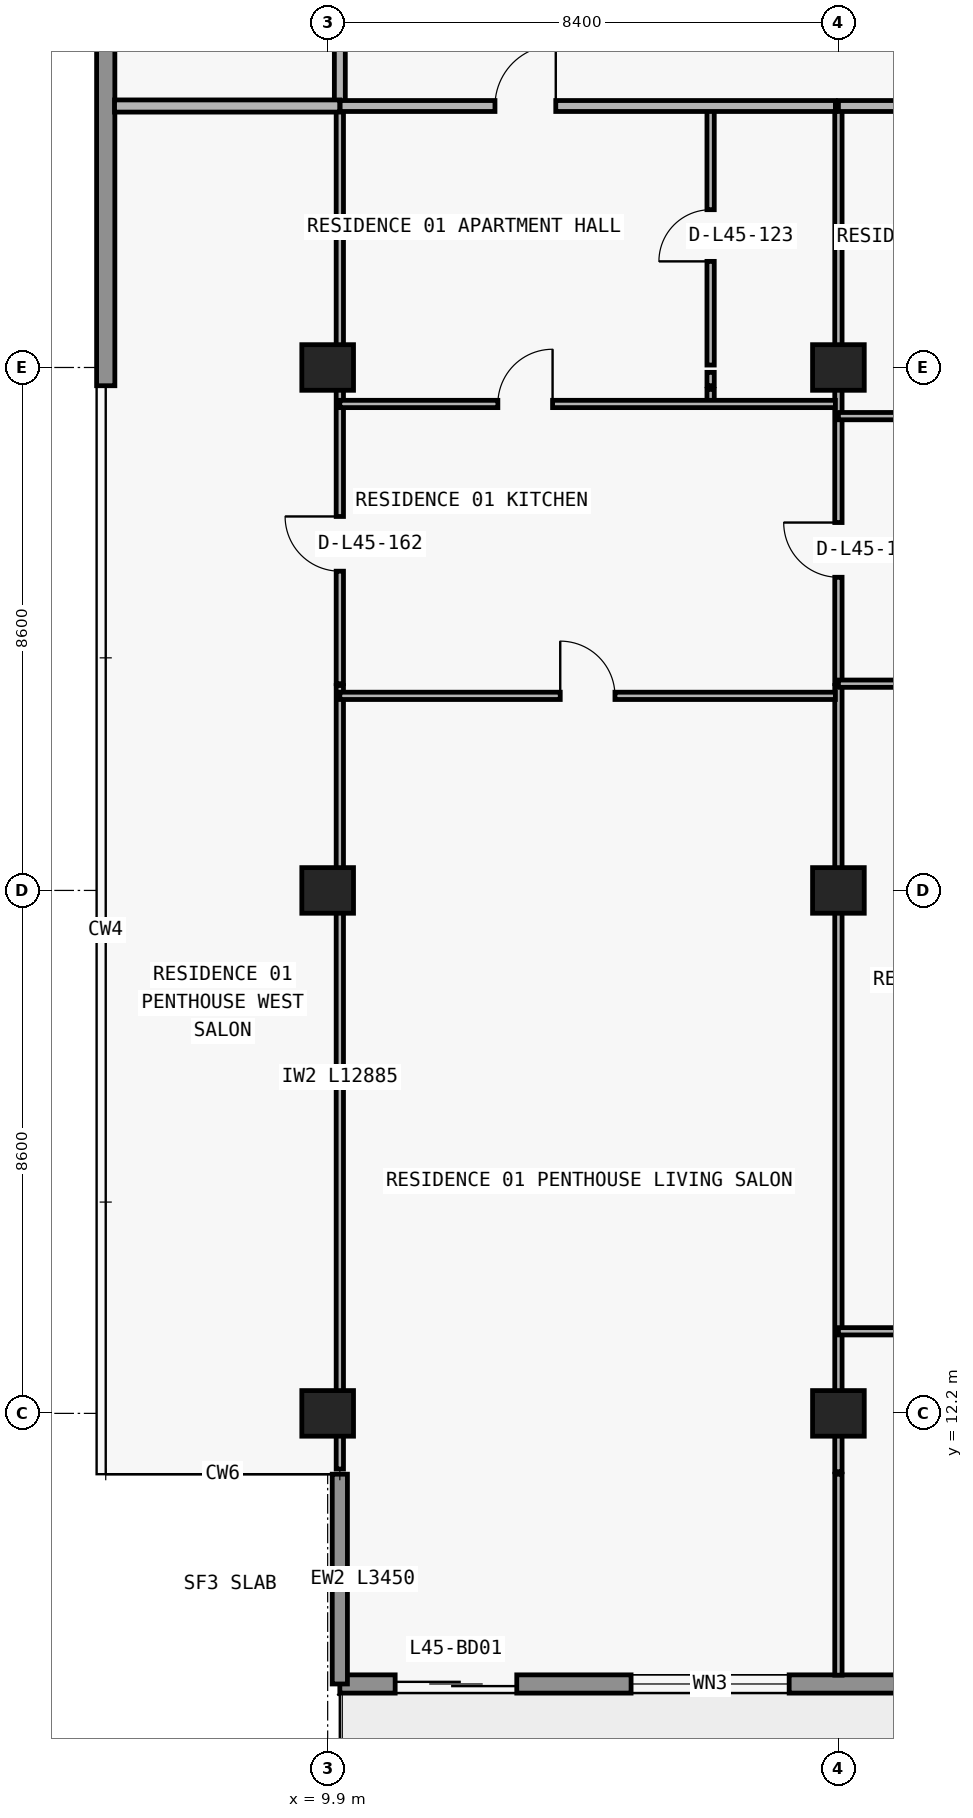
"""IFC4 building model, lengths in metres.
Left out: names, types, materials, properties, quantities, classifications, styles, units other than length and angle.
Written with IfcOpenShell. Run it as: python <this file> out.ifc"""

import sys

from ifc_helpers import new_model, si_unit, direction, frame, frame_2d, origin, origin_2d, place, context, subcontext, project, spatial, rectangle, extrude, element, fill, save


model = new_model("IFC4")
c1 = context("Model", 3, precision=1e-05, world=origin(), true_north=direction((0.0, 1.0)))
c2 = subcontext(c1, "Body", "Model", "MODEL_VIEW")
j1 = project(units=[si_unit("LENGTHUNIT", "METRE"), si_unit("PLANEANGLEUNIT", "RADIAN")], contexts=[c1])
p1 = place(None, origin())
s1 = spatial("IfcSite", under=j1, at=p1, CompositionType="ELEMENT")
p2 = place(p1, origin())
s2 = spatial("IfcBuilding", under=s1, at=p2, CompositionType="ELEMENT")
p3 = place(p2, frame((0.0, 0.0, 163.8)))
s3 = spatial("IfcBuildingStorey", under=s2, at=p3, CompositionType="ELEMENT", Elevation=163.8)
for number, where, z_axis, x_axis in (
    (1, (9.9, 12.2, 0.0), (0.0, 0.0, 1.0), (1.0, 0.0, 0.0)),
    (2, (18.3, 12.2, 0.0), (0.0, 0.0, 1.0), (1.0, 0.0, 0.0)),
    (3, (9.9, 20.8, 0.0), (0.0, 0.0, 1.0), (1.0, 0.0, 0.0)),
    (4, (18.3, 20.8, 0.0), (0.0, 0.0, 1.0), (1.0, 0.0, 0.0)),
    (5, (9.9, 29.4, 0.0), (0.0, 0.0, 1.0), (1.0, 0.0, 0.0)),
    (6, (18.3, 29.4, 0.0), (0.0, 0.0, 1.0), (1.0, 0.0, 0.0)),
):
    element("IfcColumn", number, at=place(p3, frame(where, z_axis=z_axis, x_axis=x_axis)), inside=s3, PredefinedType="COLUMN", context=c2, shape_type="SweptSolid", body=[
        extrude(rectangle(XDim=0.85, YDim=0.75, at=origin_2d()), origin(), (0.0, 0.0, 1.0), 3.05),
    ])
p4 = place(p3, frame((67.7, 7.75, 0.0), z_axis=(0.0, 0.0, 1.0), x_axis=(-1.0, 0.0, 0.0)))
e7 = element("IfcWall", 7, at=p4, inside=s3, PredefinedType="STANDARD", context=c2, shape_type="SweptSolid", body=[
    extrude(rectangle(XDim=57.6, YDim=0.3, at=frame_2d((28.8, 0.0))), origin(), (0.0, 0.0, 1.0), 3.05),
])
p5 = place(p4, frame((54.69, 0.0, 0.0)))
e8 = element("IfcOpeningElement", 8, at=p5, cuts=e7, PredefinedType="OPENING", context=c2, shape_type="SweptSolid", body=[
    extrude(rectangle(XDim=2.0, YDim=2.3, at=frame_2d((1.0, 1.15))), frame((0.0, 0.16, 0.0), z_axis=(0.0, -1.0, 0.0), x_axis=(1.0, 0.0, 0.0)), (0.0, 0.0, 1.0), 0.32),
])
p6 = place(p4, frame((50.21, 0.0, 0.65)))
e9 = element("IfcOpeningElement", 9, at=p6, cuts=e7, PredefinedType="OPENING", context=c2, shape_type="SweptSolid", body=[
    extrude(rectangle(XDim=2.6, YDim=1.85, at=frame_2d((1.3, 0.925))), frame((0.0, 0.16, 0.0), z_axis=(0.0, -1.0, 0.0), x_axis=(1.0, 0.0, 0.0)), (0.0, 0.0, 1.0), 0.32),
])
p7 = place(p4, frame((44.1, 0.0, 0.85)))
e10 = element("IfcOpeningElement", 10, at=p7, cuts=e7, PredefinedType="OPENING", context=c2, shape_type="SweptSolid", body=[
    extrude(rectangle(XDim=2.2, YDim=1.55, at=frame_2d((1.1, 0.775))), frame((0.0, 0.16, 0.0), z_axis=(0.0, -1.0, 0.0), x_axis=(1.0, 0.0, 0.0)), (0.0, 0.0, 1.0), 0.32),
])
p8 = place(p4, frame((37.69, 0.0, 0.0)))
e11 = element("IfcOpeningElement", 11, at=p8, cuts=e7, PredefinedType="OPENING", context=c2, shape_type="SweptSolid", body=[
    extrude(rectangle(XDim=2.0, YDim=2.3, at=frame_2d((1.0, 1.15))), frame((0.0, 0.16, 0.0), z_axis=(0.0, -1.0, 0.0), x_axis=(1.0, 0.0, 0.0)), (0.0, 0.0, 1.0), 0.32),
])
p9 = place(p4, frame((33.59, 0.0, 0.85)))
e12 = element("IfcOpeningElement", 12, at=p9, cuts=e7, PredefinedType="OPENING", context=c2, shape_type="SweptSolid", body=[
    extrude(rectangle(XDim=1.8, YDim=1.55, at=frame_2d((0.9, 0.775))), frame((0.0, 0.16, 0.0), z_axis=(0.0, -1.0, 0.0), x_axis=(1.0, 0.0, 0.0)), (0.0, 0.0, 1.0), 0.32),
])
p10 = place(p4, frame((25.914, 0.0, 0.85)))
e13 = element("IfcOpeningElement", 13, at=p10, cuts=e7, PredefinedType="OPENING", context=c2, shape_type="SweptSolid", body=[
    extrude(rectangle(XDim=2.2, YDim=1.55, at=frame_2d((1.1, 0.775))), frame((0.0, 0.16, 0.0), z_axis=(0.0, -1.0, 0.0), x_axis=(1.0, 0.0, 0.0)), (0.0, 0.0, 1.0), 0.32),
])
p11 = place(p4, frame((21.69, 0.0, 0.0)))
e14 = element("IfcOpeningElement", 14, at=p11, cuts=e7, PredefinedType="OPENING", context=c2, shape_type="SweptSolid", body=[
    extrude(rectangle(XDim=2.0, YDim=2.3, at=frame_2d((1.0, 1.15))), frame((0.0, 0.16, 0.0), z_axis=(0.0, -1.0, 0.0), x_axis=(1.0, 0.0, 0.0)), (0.0, 0.0, 1.0), 0.32),
])
p12 = place(p4, frame((17.59, 0.0, 0.85)))
e15 = element("IfcOpeningElement", 15, at=p12, cuts=e7, PredefinedType="OPENING", context=c2, shape_type="SweptSolid", body=[
    extrude(rectangle(XDim=1.8, YDim=1.55, at=frame_2d((0.9, 0.775))), frame((0.0, 0.16, 0.0), z_axis=(0.0, -1.0, 0.0), x_axis=(1.0, 0.0, 0.0)), (0.0, 0.0, 1.0), 0.32),
])
p13 = place(p4, frame((13.69, 0.0, 0.0)))
e16 = element("IfcOpeningElement", 16, at=p13, cuts=e7, PredefinedType="OPENING", context=c2, shape_type="SweptSolid", body=[
    extrude(rectangle(XDim=2.0, YDim=2.3, at=frame_2d((1.0, 1.15))), frame((0.0, 0.16, 0.0), z_axis=(0.0, -1.0, 0.0), x_axis=(1.0, 0.0, 0.0)), (0.0, 0.0, 1.0), 0.32),
])
p14 = place(p4, frame((9.01, 0.0, 0.65)))
e17 = element("IfcOpeningElement", 17, at=p14, cuts=e7, PredefinedType="OPENING", context=c2, shape_type="SweptSolid", body=[
    extrude(rectangle(XDim=2.6, YDim=1.85, at=frame_2d((1.3, 0.925))), frame((0.0, 0.16, 0.0), z_axis=(0.0, -1.0, 0.0), x_axis=(1.0, 0.0, 0.0)), (0.0, 0.0, 1.0), 0.32),
])
p15 = place(p4, frame((3.0, 0.0, 0.85)))
e18 = element("IfcOpeningElement", 18, at=p15, cuts=e7, PredefinedType="OPENING", context=c2, shape_type="SweptSolid", body=[
    extrude(rectangle(XDim=2.2, YDim=1.55, at=frame_2d((1.1, 0.775))), frame((0.0, 0.16, 0.0), z_axis=(0.0, -1.0, 0.0), x_axis=(1.0, 0.0, 0.0)), (0.0, 0.0, 1.0), 0.32),
])
p16 = place(p3, frame((10.1, 11.2, 0.0), z_axis=(0.0, 0.0, 1.0), x_axis=(0.0, -1.0, 0.0)))
e19 = element("IfcWall", 19, at=p16, inside=s3, PredefinedType="ELEMENTEDWALL", context=c2, shape_type="SweptSolid", body=[
    extrude(rectangle(XDim=3.45, YDim=0.25, at=frame_2d((1.725, 0.0))), origin(), (0.0, 0.0, 1.0), 3.05),
])
p17 = place(p3, frame((6.25, 29.1, 0.0), z_axis=(0.0, 0.0, 1.0), x_axis=(0.0, 1.0, 0.0)))
e20 = element("IfcWall", 20, at=p17, inside=s3, PredefinedType="STANDARD", context=c2, shape_type="SweptSolid", body=[
    extrude(rectangle(XDim=17.9, YDim=0.3, at=frame_2d((8.95, 0.0))), origin(), (0.0, 0.0, 1.0), 3.05),
])
p18 = place(p3, frame((10.1, 11.285, 0.0), z_axis=(0.0, 0.0, 1.0), x_axis=(0.0, 1.0, 0.0)))
e21 = element("IfcWall", 21, at=p18, inside=s3, PredefinedType="PARTITIONING", context=c2, shape_type="SweptSolid", body=[
    extrude(rectangle(XDim=12.885, YDim=0.12, at=frame_2d((6.442, 0.0))), origin(), (0.0, 0.0, 1.0), 2.263),
])
p19 = place(p3, frame((10.1, 24.2, 0.0), z_axis=(0.0, 0.0, 1.0), x_axis=(0.0, 1.0, 0.0)))
e22 = element("IfcWall", 22, at=p19, inside=s3, PredefinedType="PARTITIONING", context=c2, shape_type="SweptSolid", body=[
    extrude(rectangle(XDim=4.84, YDim=0.12, at=frame_2d((2.42, 0.0))), origin(), (0.0, 0.0, 1.0), 2.263),
])
p20 = place(p19, frame((1.85, 0.0, 0.0)))
e23 = element("IfcOpeningElement", 23, at=p20, cuts=e22, PredefinedType="OPENING", context=c2, shape_type="SweptSolid", body=[
    extrude(rectangle(XDim=0.9, YDim=2.15, at=frame_2d((0.45, 1.075))), frame((0.0, 0.07, 0.0), z_axis=(0.0, -1.0, 0.0), x_axis=(1.0, 0.0, 0.0)), (0.0, 0.0, 1.0), 0.14),
])
p21 = place(p3, frame((10.1, 29.1, 0.0), z_axis=(0.0, 0.0, 1.0), x_axis=(0.0, 1.0, 0.0)))
e24 = element("IfcWall", 24, at=p21, inside=s3, PredefinedType="PARTITIONING", context=c2, shape_type="SweptSolid", body=[
    extrude(rectangle(XDim=0.22, YDim=0.12, at=frame_2d((0.11, 0.0))), origin(), (0.0, 0.0, 1.0), 3.05),
])
p22 = place(p3, frame((10.1, 29.44, 0.0), z_axis=(0.0, 0.0, 1.0), x_axis=(0.0, 1.0, 0.0)))
e25 = element("IfcWall", 25, at=p22, inside=s3, PredefinedType="PARTITIONING", context=c2, shape_type="SweptSolid", body=[
    extrude(rectangle(XDim=4.26, YDim=0.12, at=frame_2d((2.13, 0.0))), origin(), (0.0, 0.0, 1.0), 2.263),
])
p23 = place(p3, frame((10.1, 33.705, 0.0), z_axis=(0.0, 0.0, 1.0), x_axis=(0.0, 1.0, 0.0)))
e26 = element("IfcWall", 26, at=p23, inside=s3, PredefinedType="PARTITIONING", context=c2, shape_type="SweptSolid", body=[
    extrude(rectangle(XDim=3.245, YDim=0.18, at=frame_2d((1.623, 0.0))), origin(), (0.0, 0.0, 1.0), 2.263),
])
p24 = place(p3, frame((16.198, 28.8, 0.0), z_axis=(0.0, 0.0, 1.0), x_axis=(0.0, 1.0, 0.0)))
e27 = element("IfcWall", 27, at=p24, inside=s3, PredefinedType="PARTITIONING", context=c2, shape_type="SweptSolid", body=[
    extrude(rectangle(XDim=0.24, YDim=0.12, at=frame_2d((0.12, 0.0))), origin(), (0.0, 0.0, 1.0), 2.725),
])
p25 = place(p3, frame((16.198, 29.1, 0.0), z_axis=(0.0, 0.0, 1.0), x_axis=(0.0, 1.0, 0.0)))
e28 = element("IfcWall", 28, at=p25, inside=s3, PredefinedType="PARTITIONING", context=c2, shape_type="SweptSolid", body=[
    extrude(rectangle(XDim=0.22, YDim=0.12, at=frame_2d((0.11, 0.0))), origin(), (0.0, 0.0, 1.0), 2.725),
])
p26 = place(p3, frame((16.198, 29.44, 0.0), z_axis=(0.0, 0.0, 1.0), x_axis=(0.0, 1.0, 0.0)))
e29 = element("IfcWall", 29, at=p26, inside=s3, PredefinedType="PARTITIONING", context=c2, shape_type="SweptSolid", body=[
    extrude(rectangle(XDim=4.26, YDim=0.12, at=frame_2d((2.13, 0.0))), origin(), (0.0, 0.0, 1.0), 2.725),
])
p27 = place(p26, frame((1.705, 0.0, 0.0)))
e30 = element("IfcOpeningElement", 30, at=p27, cuts=e29, PredefinedType="OPENING", context=c2, shape_type="SweptSolid", body=[
    extrude(rectangle(XDim=0.85, YDim=2.1, at=frame_2d((0.425, 1.05))), frame((0.0, 0.07, 0.0), z_axis=(0.0, -1.0, 0.0), x_axis=(1.0, 0.0, 0.0)), (0.0, 0.0, 1.0), 0.14),
])
p28 = place(p3, frame((18.3, 7.895, 0.0), z_axis=(0.0, 0.0, 1.0), x_axis=(0.0, 1.0, 0.0)))
e31 = element("IfcWall", 31, at=p28, inside=s3, PredefinedType="PARTITIONING", context=c2, shape_type="SweptSolid", body=[
    extrude(rectangle(XDim=3.305, YDim=0.12, at=frame_2d((1.652, 0.0))), origin(), (0.0, 0.0, 1.0), 3.05),
])
p29 = place(p3, frame((18.3, 11.24, 0.0), z_axis=(0.0, 0.0, 1.0), x_axis=(0.0, 1.0, 0.0)))
e32 = element("IfcWall", 32, at=p29, inside=s3, PredefinedType="PARTITIONING", context=c2, shape_type="SweptSolid", body=[
    extrude(rectangle(XDim=12.93, YDim=0.12, at=frame_2d((6.465, 0.0))), origin(), (0.0, 0.0, 1.0), 2.263),
])
p30 = place(p3, frame((18.3, 24.2, 0.0), z_axis=(0.0, 0.0, 1.0), x_axis=(0.0, 1.0, 0.0)))
e33 = element("IfcWall", 33, at=p30, inside=s3, PredefinedType="PARTITIONING", context=c2, shape_type="SweptSolid", body=[
    extrude(rectangle(XDim=4.84, YDim=0.12, at=frame_2d((2.42, 0.0))), origin(), (0.0, 0.0, 1.0), 2.263),
])
p31 = place(p30, frame((1.75, 0.0, 0.0)))
e34 = element("IfcOpeningElement", 34, at=p31, cuts=e33, PredefinedType="OPENING", context=c2, shape_type="SweptSolid", body=[
    extrude(rectangle(XDim=0.9, YDim=2.15, at=frame_2d((0.45, 1.075))), frame((0.0, 0.07, 0.0), z_axis=(0.0, -1.0, 0.0), x_axis=(1.0, 0.0, 0.0)), (0.0, 0.0, 1.0), 0.14),
])
p32 = place(p3, frame((18.3, 29.1, 0.0), z_axis=(0.0, 0.0, 1.0), x_axis=(0.0, 1.0, 0.0)))
e35 = element("IfcWall", 35, at=p32, inside=s3, PredefinedType="PARTITIONING", context=c2, shape_type="SweptSolid", body=[
    extrude(rectangle(XDim=0.22, YDim=0.12, at=frame_2d((0.11, 0.0))), origin(), (0.0, 0.0, 1.0), 3.05),
])
p33 = place(p3, frame((18.3, 29.44, 0.0), z_axis=(0.0, 0.0, 1.0), x_axis=(0.0, 1.0, 0.0)))
e36 = element("IfcWall", 36, at=p33, inside=s3, PredefinedType="PARTITIONING", context=c2, shape_type="SweptSolid", body=[
    extrude(rectangle(XDim=4.26, YDim=0.12, at=frame_2d((2.13, 0.0))), origin(), (0.0, 0.0, 1.0), 2.263),
])
p34 = place(p3, frame((18.3, 13.55, 0.0), z_axis=(0.0, 0.0, 1.0), x_axis=(1.0, 0.0, 0.0)))
e37 = element("IfcWall", 37, at=p34, inside=s3, PredefinedType="PARTITIONING", context=c2, shape_type="SweptSolid", body=[
    extrude(rectangle(XDim=8.4, YDim=0.12, at=frame_2d((4.2, 0.0))), origin(), (0.0, 0.0, 1.0), 3.05),
])
p35 = place(p34, frame((3.75, 0.0, 0.0)))
e38 = element("IfcOpeningElement", 38, at=p35, cuts=e37, PredefinedType="OPENING", context=c2, shape_type="SweptSolid", body=[
    extrude(rectangle(XDim=0.9, YDim=2.15, at=frame_2d((0.45, 1.075))), frame((0.0, 0.07, 0.0), z_axis=(0.0, -1.0, 0.0), x_axis=(1.0, 0.0, 0.0)), (0.0, 0.0, 1.0), 0.14),
])
p36 = place(p3, frame((10.1, 24.0, 0.0), z_axis=(0.0, 0.0, 1.0), x_axis=(1.0, 0.0, 0.0)))
e39 = element("IfcWall", 39, at=p36, inside=s3, PredefinedType="PARTITIONING", context=c2, shape_type="SweptSolid", body=[
    extrude(rectangle(XDim=8.15, YDim=0.12, at=frame_2d((4.075, 0.0))), origin(), (0.0, 0.0, 1.0), 3.05),
])
p37 = place(p36, frame((3.625, 0.0, 0.0)))
e40 = element("IfcOpeningElement", 40, at=p37, cuts=e39, PredefinedType="OPENING", context=c2, shape_type="SweptSolid", body=[
    extrude(rectangle(XDim=0.9, YDim=2.15, at=frame_2d((0.45, 1.075))), frame((0.0, 0.07, 0.0), z_axis=(0.0, -1.0, 0.0), x_axis=(1.0, 0.0, 0.0)), (0.0, 0.0, 1.0), 0.14),
])
p38 = place(p3, frame((18.3, 24.2, 0.0), z_axis=(0.0, 0.0, 1.0), x_axis=(1.0, 0.0, 0.0)))
e41 = element("IfcWall", 41, at=p38, inside=s3, PredefinedType="PARTITIONING", context=c2, shape_type="SweptSolid", body=[
    extrude(rectangle(XDim=8.18, YDim=0.12, at=frame_2d((4.09, 0.0))), origin(), (0.0, 0.0, 1.0), 3.05),
])
p39 = place(p38, frame((3.64, 0.0, 0.0)))
e42 = element("IfcOpeningElement", 42, at=p39, cuts=e41, PredefinedType="OPENING", context=c2, shape_type="SweptSolid", body=[
    extrude(rectangle(XDim=0.9, YDim=2.15, at=frame_2d((0.45, 1.075))), frame((0.0, 0.07, 0.0), z_axis=(0.0, -1.0, 0.0), x_axis=(1.0, 0.0, 0.0)), (0.0, 0.0, 1.0), 0.14),
])
p40 = place(p3, frame((18.3, 28.6, 0.0), z_axis=(0.0, 0.0, 1.0), x_axis=(1.0, 0.0, 0.0)))
e43 = element("IfcWall", 43, at=p40, inside=s3, PredefinedType="PARTITIONING", context=c2, shape_type="SweptSolid", body=[
    extrude(rectangle(XDim=8.18, YDim=0.12, at=frame_2d((4.09, 0.0))), origin(), (0.0, 0.0, 1.0), 3.05),
])
p41 = place(p40, frame((2.809, 0.0, 0.0)))
e44 = element("IfcOpeningElement", 44, at=p41, cuts=e43, PredefinedType="OPENING", context=c2, shape_type="SweptSolid", body=[
    extrude(rectangle(XDim=0.9, YDim=2.15, at=frame_2d((0.45, 1.075))), frame((0.0, 0.07, 0.0), z_axis=(0.0, -1.0, 0.0), x_axis=(1.0, 0.0, 0.0)), (0.0, 0.0, 1.0), 0.14),
])
p42 = place(p3, frame((10.1, 28.8, 0.0), z_axis=(0.0, 0.0, 1.0), x_axis=(1.0, 0.0, 0.0)))
e45 = element("IfcWall", 45, at=p42, inside=s3, PredefinedType="PARTITIONING", context=c2, shape_type="SweptSolid", body=[
    extrude(rectangle(XDim=8.15, YDim=0.12, at=frame_2d((4.075, 0.0))), origin(), (0.0, 0.0, 1.0), 3.05),
])
p43 = place(p42, frame((2.599, 0.0, 0.0)))
e46 = element("IfcOpeningElement", 46, at=p43, cuts=e45, PredefinedType="OPENING", context=c2, shape_type="SweptSolid", body=[
    extrude(rectangle(XDim=0.9, YDim=2.15, at=frame_2d((0.45, 1.075))), frame((0.0, 0.07, 0.0), z_axis=(0.0, -1.0, 0.0), x_axis=(1.0, 0.0, 0.0)), (0.0, 0.0, 1.0), 0.14),
])
p44 = place(p3, frame((6.395, 33.7, 0.0), z_axis=(0.0, 0.0, 1.0), x_axis=(1.0, 0.0, 0.0)))
e47 = element("IfcWall", 47, at=p44, inside=s3, PredefinedType="PARTITIONING", context=c2, shape_type="SweptSolid", body=[
    extrude(rectangle(XDim=3.705, YDim=0.2, at=frame_2d((1.853, 0.0))), origin(), (0.0, 0.0, 1.0), 3.05),
])
p45 = place(p3, frame((10.105, 33.7, 0.0), z_axis=(0.0, 0.0, 1.0), x_axis=(1.0, 0.0, 0.0)))
e48 = element("IfcWall", 48, at=p45, inside=s3, PredefinedType="PARTITIONING", context=c2, shape_type="SweptSolid", body=[
    extrude(rectangle(XDim=8.145, YDim=0.18, at=frame_2d((4.073, 0.0))), origin(), (0.0, 0.0, 1.0), 3.05),
])
p46 = place(p45, frame((2.546, 0.0, 0.0)))
e49 = element("IfcOpeningElement", 49, at=p46, cuts=e48, PredefinedType="OPENING", context=c2, shape_type="SweptSolid", body=[
    extrude(rectangle(XDim=1.0, YDim=2.2, at=frame_2d((0.5, 1.1))), frame((0.0, 0.1, 0.0), z_axis=(0.0, -1.0, 0.0), x_axis=(1.0, 0.0, 0.0)), (0.0, 0.0, 1.0), 0.2),
])
p47 = place(p3, frame((18.3, 33.7, 0.0), z_axis=(0.0, 0.0, 1.0), x_axis=(1.0, 0.0, 0.0)))
e50 = element("IfcWall", 50, at=p47, inside=s3, PredefinedType="PARTITIONING", context=c2, shape_type="SweptSolid", body=[
    extrude(rectangle(XDim=20.372, YDim=0.18, at=frame_2d((10.186, 0.0))), origin(), (0.0, 0.0, 1.0), 3.05),
])
p48 = place(p47, frame((10.891, 0.0, 0.0)))
e51 = element("IfcOpeningElement", 51, at=p48, cuts=e50, PredefinedType="OPENING", context=c2, shape_type="SweptSolid", body=[
    extrude(rectangle(XDim=1.0, YDim=2.2, at=frame_2d((0.5, 1.1))), frame((0.0, 0.1, 0.0), z_axis=(0.0, -1.0, 0.0), x_axis=(1.0, 0.0, 0.0)), (0.0, 0.0, 1.0), 0.2),
])
p49 = place(p47, frame((18.086, 0.0, 0.0)))
e52 = element("IfcOpeningElement", 52, at=p49, cuts=e50, PredefinedType="OPENING", context=c2, shape_type="SweptSolid", body=[
    extrude(rectangle(XDim=1.0, YDim=2.2, at=frame_2d((0.5, 1.1))), frame((0.0, 0.1, 0.0), z_axis=(0.0, -1.0, 0.0), x_axis=(1.0, 0.0, 0.0)), (0.0, 0.0, 1.0), 0.2),
])
p50 = place(p5, origin())
e53 = element("IfcDoor", 53, at=p50, inside=s3, OperationType="DOUBLE_DOOR_SLIDING", PredefinedType="DOOR", context=c2, shape_type="SweptSolid", body=[
    extrude(rectangle(XDim=2.0, YDim=2.3, at=frame_2d((1.0, 1.15))), frame((0.0, 0.025, 0.0), z_axis=(0.0, -1.0, 0.0), x_axis=(1.0, 0.0, 0.0)), (0.0, 0.0, 1.0), 0.05),
])
fill(e8, e53)
p51 = place(p6, origin())
e54 = element("IfcWindow", 54, at=p51, inside=s3, PartitioningType="SINGLE_PANEL", PredefinedType="WINDOW", context=c2, shape_type="SweptSolid", body=[
    extrude(rectangle(XDim=2.6, YDim=1.85, at=frame_2d((1.3, 0.925))), frame((0.0, 0.03, 0.0), z_axis=(0.0, -1.0, 0.0), x_axis=(1.0, 0.0, 0.0)), (0.0, 0.0, 1.0), 0.06),
])
fill(e9, e54)
p52 = place(p46, origin())
e55 = element("IfcDoor", 55, at=p52, inside=s3, OperationType="SINGLE_SWING_RIGHT", PredefinedType="DOOR", context=c2, shape_type="SweptSolid", body=[
    extrude(rectangle(XDim=1.0, YDim=2.2, at=frame_2d((0.5, 1.1))), frame((0.0, 0.025, 0.0), z_axis=(0.0, -1.0, 0.0), x_axis=(1.0, 0.0, 0.0)), (0.0, 0.0, 1.0), 0.05),
])
fill(e49, e55)
p53 = place(p27, origin())
e56 = element("IfcDoor", 56, at=p53, inside=s3, OperationType="SINGLE_SWING_LEFT", PredefinedType="DOOR", context=c2, shape_type="SweptSolid", body=[
    extrude(rectangle(XDim=0.85, YDim=2.1, at=frame_2d((0.425, 1.05))), frame((0.0, 0.025, 0.0), z_axis=(0.0, -1.0, 0.0), x_axis=(1.0, 0.0, 0.0)), (0.0, 0.0, 1.0), 0.05),
])
fill(e30, e56)
p54 = place(p43, origin())
e57 = element("IfcDoor", 57, at=p54, inside=s3, OperationType="SINGLE_SWING_RIGHT", PredefinedType="DOOR", context=c2, shape_type="SweptSolid", body=[
    extrude(rectangle(XDim=0.9, YDim=2.15, at=frame_2d((0.45, 1.075))), frame((0.0, 0.025, 0.0), z_axis=(0.0, -1.0, 0.0), x_axis=(1.0, 0.0, 0.0)), (0.0, 0.0, 1.0), 0.05),
])
fill(e46, e57)
p55 = place(p37, origin())
e58 = element("IfcDoor", 58, at=p55, inside=s3, OperationType="SINGLE_SWING_LEFT", PredefinedType="DOOR", context=c2, shape_type="SweptSolid", body=[
    extrude(rectangle(XDim=0.9, YDim=2.15, at=frame_2d((0.45, 1.075))), frame((0.0, 0.025, 0.0), z_axis=(0.0, -1.0, 0.0), x_axis=(1.0, 0.0, 0.0)), (0.0, 0.0, 1.0), 0.05),
])
fill(e40, e58)
p56 = place(p31, origin())
e59 = element("IfcDoor", 59, at=p56, inside=s3, OperationType="SINGLE_SWING_RIGHT", PredefinedType="DOOR", context=c2, shape_type="SweptSolid", body=[
    extrude(rectangle(XDim=0.9, YDim=2.15, at=frame_2d((0.45, 1.075))), frame((0.0, 0.025, 0.0), z_axis=(0.0, -1.0, 0.0), x_axis=(1.0, 0.0, 0.0)), (0.0, 0.0, 1.0), 0.05),
])
fill(e34, e59)
p57 = place(p20, origin())
e60 = element("IfcDoor", 60, at=p57, inside=s3, OperationType="SINGLE_SWING_RIGHT", PredefinedType="DOOR", context=c2, shape_type="SweptSolid", body=[
    extrude(rectangle(XDim=0.9, YDim=2.15, at=frame_2d((0.45, 1.075))), frame((0.0, 0.025, 0.0), z_axis=(0.0, -1.0, 0.0), x_axis=(1.0, 0.0, 0.0)), (0.0, 0.0, 1.0), 0.05),
])
fill(e23, e60)
save(model, sys.argv[1])
